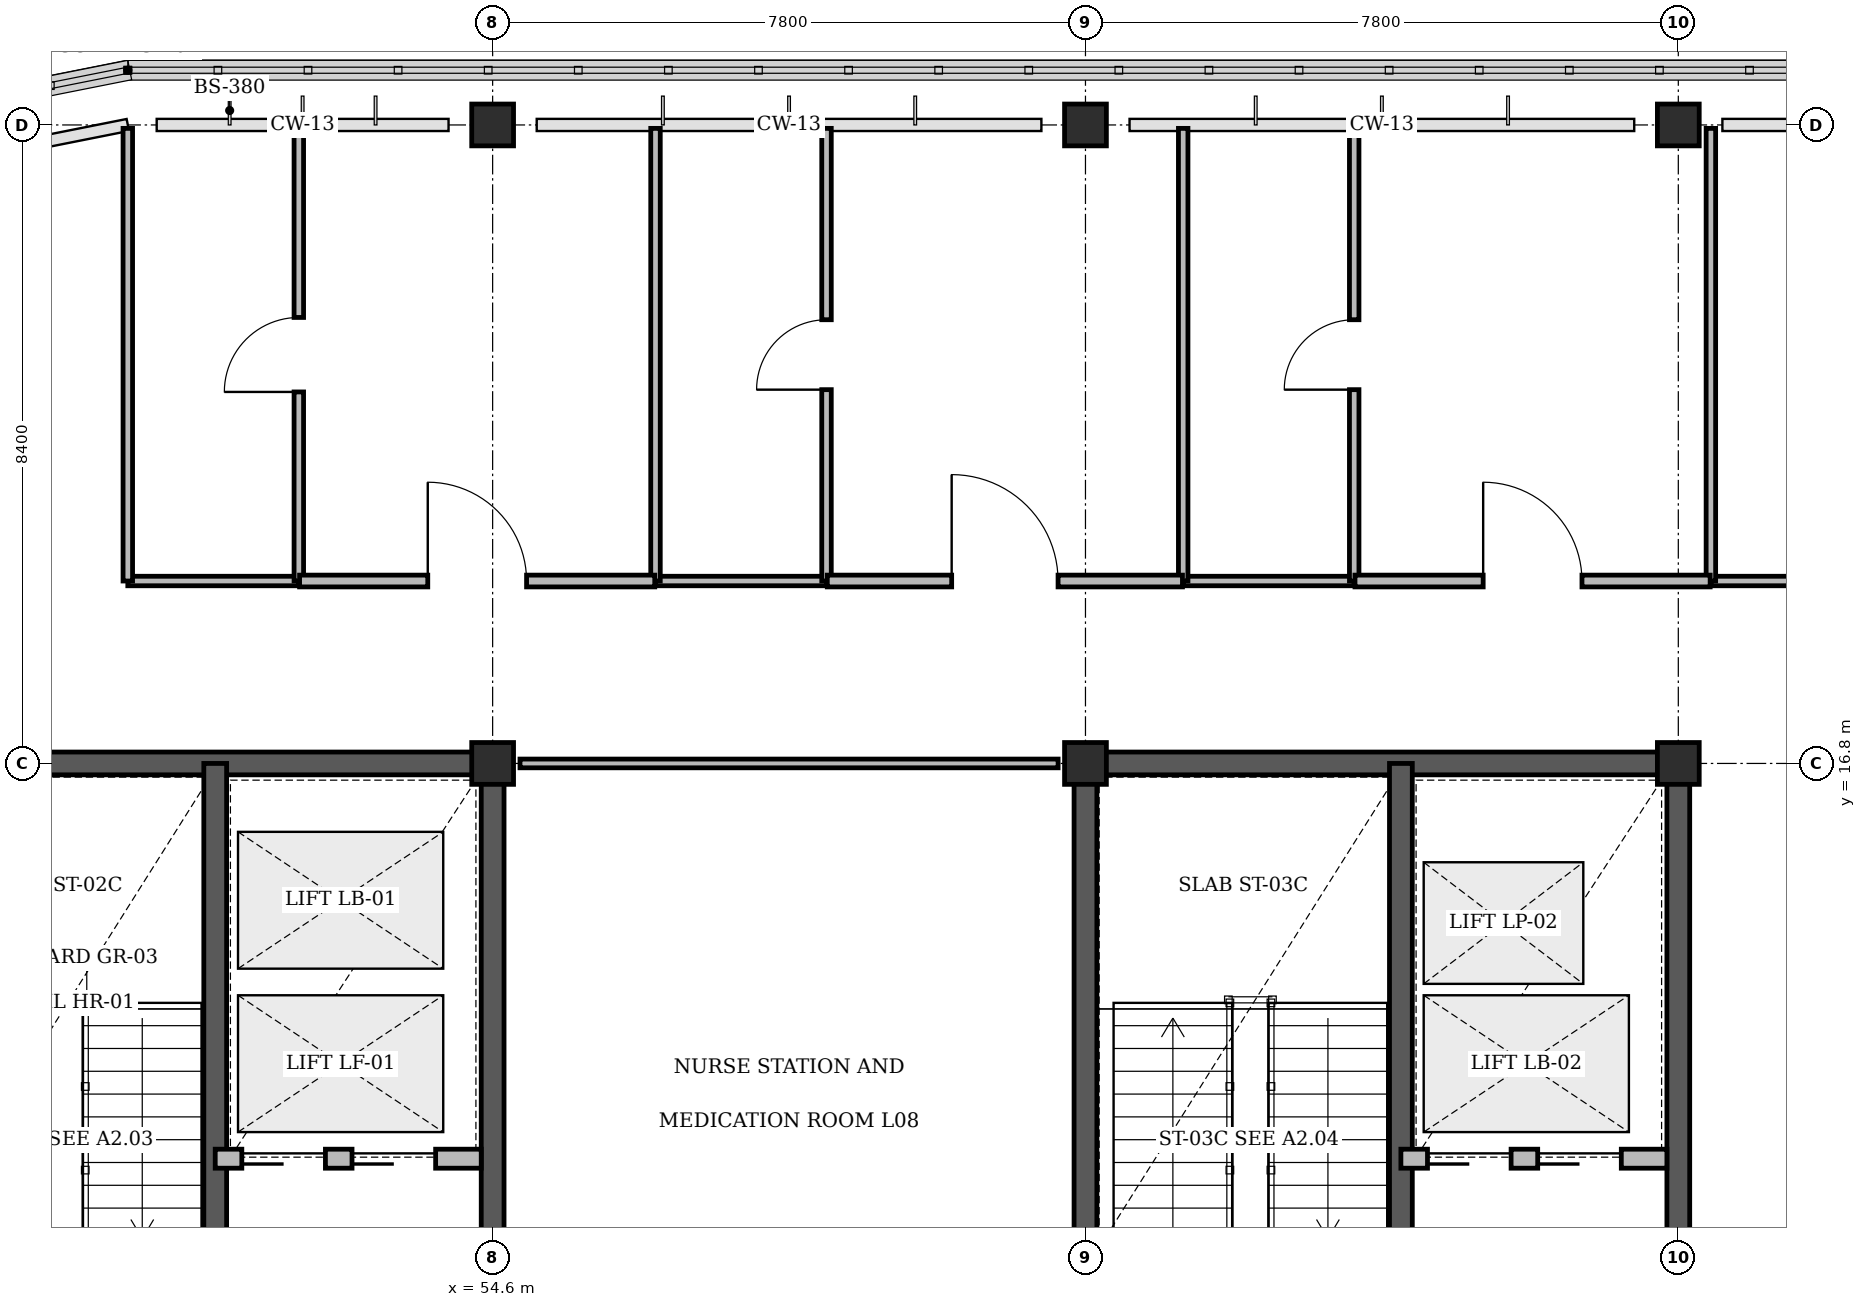
"""IFC4 building model, lengths in metres.
Left out: names, types, materials, properties, quantities, classifications, styles, units other than length and angle.
Written with IfcOpenShell. Run it as: python <this file> out.ifc"""

import sys

from ifc_helpers import new_model, si_unit, direction, frame, frame_2d, origin, origin_2d, place, context, subcontext, project, spatial, rectangle, extrude, element, fill, save


model = new_model("IFC4")
c1 = context("Model", 3, precision=1e-05, world=origin(), true_north=direction((0.0, 1.0)))
c2 = subcontext(c1, "Body", "Model", "MODEL_VIEW")
j1 = project(units=[si_unit("LENGTHUNIT", "METRE"), si_unit("PLANEANGLEUNIT", "RADIAN")], contexts=[c1])
p1 = place(None, origin())
s1 = spatial("IfcSite", under=j1, at=p1, CompositionType="ELEMENT")
p2 = place(p1, origin())
s2 = spatial("IfcBuilding", under=s1, at=p2, CompositionType="ELEMENT")
p3 = place(p2, frame((0.0, 0.0, 34.8)))
s3 = spatial("IfcBuildingStorey", under=s2, at=p3, CompositionType="ELEMENT", Elevation=34.8)
p4 = place(p3, frame((46.65, 16.8, 0.0), z_axis=(0.0, 0.0, 1.0), x_axis=(1.0, 0.0, 0.0)))
e1 = element("IfcWall", 1, at=p4, inside=s3, PredefinedType="SHEAR", context=c2, shape_type="SweptSolid", body=[
    extrude(rectangle(XDim=8.1, YDim=0.3, at=frame_2d((4.05, 0.0))), origin(), (0.0, 0.0, 1.0), 3.92),
])
p5 = place(p3, frame((54.6, 8.4, 0.0), z_axis=(0.0, 0.0, 1.0), x_axis=(0.0, 1.0, 0.0)))
e2 = element("IfcWall", 2, at=p5, inside=s3, PredefinedType="SHEAR", context=c2, shape_type="SweptSolid", body=[
    extrude(rectangle(XDim=8.4, YDim=0.3, at=frame_2d((4.2, 0.0))), origin(), (0.0, 0.0, 1.0), 3.92),
])
p6 = place(p3, frame((62.25, 16.8, 0.0), z_axis=(0.0, 0.0, 1.0), x_axis=(1.0, 0.0, 0.0)))
e3 = element("IfcWall", 3, at=p6, inside=s3, PredefinedType="SHEAR", context=c2, shape_type="SweptSolid", body=[
    extrude(rectangle(XDim=8.1, YDim=0.3, at=frame_2d((4.05, 0.0))), origin(), (0.0, 0.0, 1.0), 3.92),
])
for number, where, z_axis, x_axis in (
    (4, (62.4, 8.4, 0.0), (0.0, 0.0, 1.0), (0.0, 1.0, 0.0)),
    (5, (70.2, 8.4, 0.0), (0.0, 0.0, 1.0), (0.0, 1.0, 0.0)),
):
    element("IfcWall", number, at=place(p3, frame(where, z_axis=z_axis, x_axis=x_axis)), inside=s3, PredefinedType="SHEAR", context=c2, shape_type="SweptSolid", body=[
        extrude(rectangle(XDim=8.4, YDim=0.3, at=frame_2d((4.2, 0.0))), origin(), (0.0, 0.0, 1.0), 3.92),
    ])
for number, where, z_axis, x_axis in (
    (6, (54.6, 16.8, 0.0), (0.0, 0.0, 1.0), (1.0, 0.0, 0.0)),
    (7, (54.6, 25.2, 0.0), (0.0, 0.0, 1.0), (1.0, 0.0, 0.0)),
    (8, (62.4, 16.8, 0.0), (0.0, 0.0, 1.0), (1.0, 0.0, 0.0)),
    (9, (62.4, 25.2, 0.0), (0.0, 0.0, 1.0), (1.0, 0.0, 0.0)),
    (10, (70.2, 16.8, 0.0), (0.0, 0.0, 1.0), (1.0, 0.0, 0.0)),
    (11, (70.2, 25.2, 0.0), (0.0, 0.0, 1.0), (1.0, 0.0, 0.0)),
):
    element("IfcColumn", number, at=place(p3, frame(where, z_axis=z_axis, x_axis=x_axis)), inside=s3, PredefinedType="COLUMN", context=c2, shape_type="SweptSolid", body=[
        extrude(rectangle(XDim=0.55, YDim=0.55, at=origin_2d()), origin(), (0.0, 0.0, 1.0), 4.2),
    ])
p7 = place(p3, frame((50.95, 8.4, 0.0), z_axis=(0.0, 0.0, 1.0), x_axis=(0.0, 1.0, 0.0)))
e12 = element("IfcWall", 12, at=p7, inside=s3, PredefinedType="SHEAR", context=c2, shape_type="SweptSolid", body=[
    extrude(rectangle(XDim=8.4, YDim=0.3, at=frame_2d((4.2, 0.0))), origin(), (0.0, 0.0, 1.0), 4.2),
])
p8 = place(p7, frame((0.4, 0.0, 0.0)))
e13 = element("IfcOpeningElement", 13, at=p8, cuts=e12, PredefinedType="OPENING", context=c2, shape_type="SweptSolid", body=[
    extrude(rectangle(XDim=1.12, YDim=2.15, at=frame_2d((0.56, 1.075))), frame((0.0, 0.16, 0.0), z_axis=(0.0, -1.0, 0.0), x_axis=(1.0, 0.0, 0.0)), (0.0, 0.0, 1.0), 0.32),
])
p9 = place(p3, frame((50.95, 11.6, 0.0), z_axis=(0.0, 0.0, 1.0), x_axis=(1.0, 0.0, 0.0)))
e14 = element("IfcWall", 14, at=p9, inside=s3, PredefinedType="STANDARD", context=c2, shape_type="SweptSolid", body=[
    extrude(rectangle(XDim=3.5, YDim=0.25, at=frame_2d((1.75, 0.0))), origin(), (0.0, 0.0, 1.0), 3.9),
])
p10 = place(p9, frame((0.35, 0.0, 0.0)))
e15 = element("IfcOpeningElement", 15, at=p10, cuts=e14, PredefinedType="OPENING", context=c2, shape_type="SweptSolid", body=[
    extrude(rectangle(XDim=1.1, YDim=2.2, at=frame_2d((0.55, 1.1))), frame((0.0, 0.135, 0.0), z_axis=(0.0, -1.0, 0.0), x_axis=(1.0, 0.0, 0.0)), (0.0, 0.0, 1.0), 0.27),
])
p11 = place(p9, frame((1.8, 0.0, 0.0)))
e16 = element("IfcOpeningElement", 16, at=p11, cuts=e14, PredefinedType="OPENING", context=c2, shape_type="SweptSolid", body=[
    extrude(rectangle(XDim=1.1, YDim=2.2, at=frame_2d((0.55, 1.1))), frame((0.0, 0.135, 0.0), z_axis=(0.0, -1.0, 0.0), x_axis=(1.0, 0.0, 0.0)), (0.0, 0.0, 1.0), 0.27),
])
p12 = place(p3, frame((66.55, 8.4, 0.0), z_axis=(0.0, 0.0, 1.0), x_axis=(0.0, 1.0, 0.0)))
e17 = element("IfcWall", 17, at=p12, inside=s3, PredefinedType="SHEAR", context=c2, shape_type="SweptSolid", body=[
    extrude(rectangle(XDim=8.4, YDim=0.3, at=frame_2d((4.2, 0.0))), origin(), (0.0, 0.0, 1.0), 4.2),
])
p13 = place(p3, frame((66.55, 11.6, 0.0), z_axis=(0.0, 0.0, 1.0), x_axis=(1.0, 0.0, 0.0)))
e18 = element("IfcWall", 18, at=p13, inside=s3, PredefinedType="STANDARD", context=c2, shape_type="SweptSolid", body=[
    extrude(rectangle(XDim=3.5, YDim=0.25, at=frame_2d((1.75, 0.0))), origin(), (0.0, 0.0, 1.0), 3.9),
])
p14 = place(p13, frame((0.35, 0.0, 0.0)))
e19 = element("IfcOpeningElement", 19, at=p14, cuts=e18, PredefinedType="OPENING", context=c2, shape_type="SweptSolid", body=[
    extrude(rectangle(XDim=1.1, YDim=2.2, at=frame_2d((0.55, 1.1))), frame((0.0, 0.135, 0.0), z_axis=(0.0, -1.0, 0.0), x_axis=(1.0, 0.0, 0.0)), (0.0, 0.0, 1.0), 0.27),
])
p15 = place(p13, frame((1.8, 0.0, 0.0)))
e20 = element("IfcOpeningElement", 20, at=p15, cuts=e18, PredefinedType="OPENING", context=c2, shape_type="SweptSolid", body=[
    extrude(rectangle(XDim=1.1, YDim=2.2, at=frame_2d((0.55, 1.1))), frame((0.0, 0.135, 0.0), z_axis=(0.0, -1.0, 0.0), x_axis=(1.0, 0.0, 0.0)), (0.0, 0.0, 1.0), 0.27),
])
p16 = place(p3, frame((49.8, 19.2, 0.0), z_axis=(0.0, 0.0, 1.0), x_axis=(1.0, 0.0, 0.0)))
e21 = element("IfcWall", 21, at=p16, inside=s3, PredefinedType="PARTITIONING", context=c2, shape_type="SweptSolid", body=[
    extrude(rectangle(XDim=2.25, YDim=0.125, at=frame_2d((1.125, 0.0))), origin(), (0.0, 0.0, 1.0), 3.9),
])
p17 = place(p3, frame((49.8, 19.2, 0.0), z_axis=(0.0, 0.0, 1.0), x_axis=(0.0, 1.0, 0.0)))
e22 = element("IfcWall", 22, at=p17, inside=s3, PredefinedType="PARTITIONING", context=c2, shape_type="SweptSolid", body=[
    extrude(rectangle(XDim=5.955, YDim=0.125, at=frame_2d((2.978, 0.0))), origin(), (0.0, 0.0, 1.0), 3.9),
])
p18 = place(p3, frame((52.05, 19.2, 0.0), z_axis=(0.0, 0.0, 1.0), x_axis=(0.0, 1.0, 0.0)))
e23 = element("IfcWall", 23, at=p18, inside=s3, PredefinedType="PARTITIONING", context=c2, shape_type="SweptSolid", body=[
    extrude(rectangle(XDim=5.955, YDim=0.125, at=frame_2d((2.978, 0.0))), origin(), (0.0, 0.0, 1.0), 3.9),
])
p19 = place(p18, frame((2.488, 0.0, 0.0)))
e24 = element("IfcOpeningElement", 24, at=p19, cuts=e23, PredefinedType="OPENING", context=c2, shape_type="SweptSolid", body=[
    extrude(rectangle(XDim=0.98, YDim=2.1, at=frame_2d((0.49, 1.05))), frame((0.0, 0.073, 0.0), z_axis=(0.0, -1.0, 0.0), x_axis=(1.0, 0.0, 0.0)), (0.0, 0.0, 1.0), 0.145),
])
p20 = place(p3, frame((56.743, 19.2, 0.0), z_axis=(0.0, 0.0, 1.0), x_axis=(1.0, 0.0, 0.0)))
e25 = element("IfcWall", 25, at=p20, inside=s3, PredefinedType="PARTITIONING", context=c2, shape_type="SweptSolid", body=[
    extrude(rectangle(XDim=2.25, YDim=0.125, at=frame_2d((1.125, 0.0))), origin(), (0.0, 0.0, 1.0), 3.9),
])
p21 = place(p3, frame((56.743, 19.2, 0.0), z_axis=(0.0, 0.0, 1.0), x_axis=(0.0, 1.0, 0.0)))
e26 = element("IfcWall", 26, at=p21, inside=s3, PredefinedType="PARTITIONING", context=c2, shape_type="SweptSolid", body=[
    extrude(rectangle(XDim=5.955, YDim=0.125, at=frame_2d((2.978, 0.0))), origin(), (0.0, 0.0, 1.0), 3.9),
])
p22 = place(p3, frame((58.993, 19.2, 0.0), z_axis=(0.0, 0.0, 1.0), x_axis=(0.0, 1.0, 0.0)))
e27 = element("IfcWall", 27, at=p22, inside=s3, PredefinedType="PARTITIONING", context=c2, shape_type="SweptSolid", body=[
    extrude(rectangle(XDim=5.955, YDim=0.125, at=frame_2d((2.978, 0.0))), origin(), (0.0, 0.0, 1.0), 3.9),
])
p23 = place(p22, frame((2.518, 0.0, 0.0)))
e28 = element("IfcOpeningElement", 28, at=p23, cuts=e27, PredefinedType="OPENING", context=c2, shape_type="SweptSolid", body=[
    extrude(rectangle(XDim=0.92, YDim=2.1, at=frame_2d((0.46, 1.05))), frame((0.0, 0.073, 0.0), z_axis=(0.0, -1.0, 0.0), x_axis=(1.0, 0.0, 0.0)), (0.0, 0.0, 1.0), 0.145),
])
p24 = place(p3, frame((63.686, 19.2, 0.0), z_axis=(0.0, 0.0, 1.0), x_axis=(1.0, 0.0, 0.0)))
e29 = element("IfcWall", 29, at=p24, inside=s3, PredefinedType="PARTITIONING", context=c2, shape_type="SweptSolid", body=[
    extrude(rectangle(XDim=2.25, YDim=0.125, at=frame_2d((1.125, 0.0))), origin(), (0.0, 0.0, 1.0), 3.9),
])
p25 = place(p3, frame((63.686, 19.2, 0.0), z_axis=(0.0, 0.0, 1.0), x_axis=(0.0, 1.0, 0.0)))
e30 = element("IfcWall", 30, at=p25, inside=s3, PredefinedType="PARTITIONING", context=c2, shape_type="SweptSolid", body=[
    extrude(rectangle(XDim=5.955, YDim=0.125, at=frame_2d((2.978, 0.0))), origin(), (0.0, 0.0, 1.0), 3.9),
])
p26 = place(p3, frame((65.936, 19.2, 0.0), z_axis=(0.0, 0.0, 1.0), x_axis=(0.0, 1.0, 0.0)))
e31 = element("IfcWall", 31, at=p26, inside=s3, PredefinedType="PARTITIONING", context=c2, shape_type="SweptSolid", body=[
    extrude(rectangle(XDim=5.955, YDim=0.125, at=frame_2d((2.978, 0.0))), origin(), (0.0, 0.0, 1.0), 3.9),
])
p27 = place(p26, frame((2.518, 0.0, 0.0)))
e32 = element("IfcOpeningElement", 32, at=p27, cuts=e31, PredefinedType="OPENING", context=c2, shape_type="SweptSolid", body=[
    extrude(rectangle(XDim=0.92, YDim=2.1, at=frame_2d((0.46, 1.05))), frame((0.0, 0.073, 0.0), z_axis=(0.0, -1.0, 0.0), x_axis=(1.0, 0.0, 0.0)), (0.0, 0.0, 1.0), 0.145),
])
p28 = place(p3, frame((70.629, 19.2, 0.0), z_axis=(0.0, 0.0, 1.0), x_axis=(1.0, 0.0, 0.0)))
e33 = element("IfcWall", 33, at=p28, inside=s3, PredefinedType="PARTITIONING", context=c2, shape_type="SweptSolid", body=[
    extrude(rectangle(XDim=2.25, YDim=0.125, at=frame_2d((1.125, 0.0))), origin(), (0.0, 0.0, 1.0), 3.9),
])
p29 = place(p3, frame((70.629, 19.2, 0.0), z_axis=(0.0, 0.0, 1.0), x_axis=(0.0, 1.0, 0.0)))
e34 = element("IfcWall", 34, at=p29, inside=s3, PredefinedType="PARTITIONING", context=c2, shape_type="SweptSolid", body=[
    extrude(rectangle(XDim=5.955, YDim=0.125, at=frame_2d((2.978, 0.0))), origin(), (0.0, 0.0, 1.0), 3.32),
])
p30 = place(p3, frame((52.06, 19.2, 0.0), z_axis=(0.0, 0.0, 1.0), x_axis=(1.0, 0.0, 0.0)))
e35 = element("IfcWall", 35, at=p30, inside=s3, PredefinedType="PARTITIONING", context=c2, shape_type="SweptSolid", body=[
    extrude(rectangle(XDim=4.673, YDim=0.155, at=frame_2d((2.336, 0.0))), origin(), (0.0, 0.0, 1.0), 3.9),
])
p31 = place(p30, frame((1.687, 0.0, 0.0)))
e36 = element("IfcOpeningElement", 36, at=p31, cuts=e35, PredefinedType="OPENING", context=c2, shape_type="SweptSolid", body=[
    extrude(rectangle(XDim=1.3, YDim=2.15, at=frame_2d((0.65, 1.075))), frame((0.0, 0.087, 0.0), z_axis=(0.0, -1.0, 0.0), x_axis=(1.0, 0.0, 0.0)), (0.0, 0.0, 1.0), 0.175),
])
p32 = place(p3, frame((59.003, 19.2, 0.0), z_axis=(0.0, 0.0, 1.0), x_axis=(1.0, 0.0, 0.0)))
e37 = element("IfcWall", 37, at=p32, inside=s3, PredefinedType="PARTITIONING", context=c2, shape_type="SweptSolid", body=[
    extrude(rectangle(XDim=4.673, YDim=0.155, at=frame_2d((2.336, 0.0))), origin(), (0.0, 0.0, 1.0), 3.9),
])
p33 = place(p32, frame((1.636, 0.0, 0.0)))
e38 = element("IfcOpeningElement", 38, at=p33, cuts=e37, PredefinedType="OPENING", context=c2, shape_type="SweptSolid", body=[
    extrude(rectangle(XDim=1.4, YDim=2.2, at=frame_2d((0.7, 1.1))), frame((0.0, 0.087, 0.0), z_axis=(0.0, -1.0, 0.0), x_axis=(1.0, 0.0, 0.0)), (0.0, 0.0, 1.0), 0.175),
])
p34 = place(p3, frame((65.946, 19.2, 0.0), z_axis=(0.0, 0.0, 1.0), x_axis=(1.0, 0.0, 0.0)))
e39 = element("IfcWall", 39, at=p34, inside=s3, PredefinedType="PARTITIONING", context=c2, shape_type="SweptSolid", body=[
    extrude(rectangle(XDim=4.673, YDim=0.155, at=frame_2d((2.336, 0.0))), origin(), (0.0, 0.0, 1.0), 3.9),
])
p35 = place(p34, frame((1.687, 0.0, 0.0)))
e40 = element("IfcOpeningElement", 40, at=p35, cuts=e39, PredefinedType="OPENING", context=c2, shape_type="SweptSolid", body=[
    extrude(rectangle(XDim=1.3, YDim=2.15, at=frame_2d((0.65, 1.075))), frame((0.0, 0.087, 0.0), z_axis=(0.0, -1.0, 0.0), x_axis=(1.0, 0.0, 0.0)), (0.0, 0.0, 1.0), 0.175),
])
p36 = place(p3, frame((54.96, 16.8, 0.0), z_axis=(0.0, 0.0, 1.0), x_axis=(1.0, 0.0, 0.0)))
e41 = element("IfcWall", 41, at=p36, inside=s3, PredefinedType="PARTITIONING", context=c2, shape_type="SweptSolid", body=[
    extrude(rectangle(XDim=7.08, YDim=0.115, at=frame_2d((3.54, 0.0))), origin(), (0.0, 0.0, 1.0), 3.32),
])
p37 = place(p10, origin())
e42 = element("IfcDoor", 42, at=p37, inside=s3, OperationType="SLIDING_TO_LEFT", PredefinedType="DOOR", context=c2, shape_type="SweptSolid", body=[
    extrude(rectangle(XDim=1.1, YDim=2.2, at=frame_2d((0.55, 1.1))), frame((0.0, 0.025, 0.0), z_axis=(0.0, -1.0, 0.0), x_axis=(1.0, 0.0, 0.0)), (0.0, 0.0, 1.0), 0.05),
])
fill(e15, e42)
p38 = place(p11, origin())
e43 = element("IfcDoor", 43, at=p38, inside=s3, OperationType="SLIDING_TO_LEFT", PredefinedType="DOOR", context=c2, shape_type="SweptSolid", body=[
    extrude(rectangle(XDim=1.1, YDim=2.2, at=frame_2d((0.55, 1.1))), frame((0.0, 0.025, 0.0), z_axis=(0.0, -1.0, 0.0), x_axis=(1.0, 0.0, 0.0)), (0.0, 0.0, 1.0), 0.05),
])
fill(e16, e43)
p39 = place(p14, origin())
e44 = element("IfcDoor", 44, at=p39, inside=s3, OperationType="SLIDING_TO_LEFT", PredefinedType="DOOR", context=c2, shape_type="SweptSolid", body=[
    extrude(rectangle(XDim=1.1, YDim=2.2, at=frame_2d((0.55, 1.1))), frame((0.0, 0.025, 0.0), z_axis=(0.0, -1.0, 0.0), x_axis=(1.0, 0.0, 0.0)), (0.0, 0.0, 1.0), 0.05),
])
fill(e19, e44)
p40 = place(p15, origin())
e45 = element("IfcDoor", 45, at=p40, inside=s3, OperationType="SLIDING_TO_LEFT", PredefinedType="DOOR", context=c2, shape_type="SweptSolid", body=[
    extrude(rectangle(XDim=1.1, YDim=2.2, at=frame_2d((0.55, 1.1))), frame((0.0, 0.025, 0.0), z_axis=(0.0, -1.0, 0.0), x_axis=(1.0, 0.0, 0.0)), (0.0, 0.0, 1.0), 0.05),
])
fill(e20, e45)
p41 = place(p19, origin())
e46 = element("IfcDoor", 46, at=p41, inside=s3, OperationType="SINGLE_SWING_LEFT", PredefinedType="DOOR", context=c2, shape_type="SweptSolid", body=[
    extrude(rectangle(XDim=0.98, YDim=2.1, at=frame_2d((0.49, 1.05))), frame((0.0, 0.025, 0.0), z_axis=(0.0, -1.0, 0.0), x_axis=(1.0, 0.0, 0.0)), (0.0, 0.0, 1.0), 0.05),
])
fill(e24, e46)
p42 = place(p23, origin())
e47 = element("IfcDoor", 47, at=p42, inside=s3, OperationType="SINGLE_SWING_LEFT", PredefinedType="DOOR", context=c2, shape_type="SweptSolid", body=[
    extrude(rectangle(XDim=0.92, YDim=2.1, at=frame_2d((0.46, 1.05))), frame((0.0, 0.025, 0.0), z_axis=(0.0, -1.0, 0.0), x_axis=(1.0, 0.0, 0.0)), (0.0, 0.0, 1.0), 0.05),
])
fill(e28, e47)
p43 = place(p27, origin())
e48 = element("IfcDoor", 48, at=p43, inside=s3, OperationType="SINGLE_SWING_LEFT", PredefinedType="DOOR", context=c2, shape_type="SweptSolid", body=[
    extrude(rectangle(XDim=0.92, YDim=2.1, at=frame_2d((0.46, 1.05))), frame((0.0, 0.025, 0.0), z_axis=(0.0, -1.0, 0.0), x_axis=(1.0, 0.0, 0.0)), (0.0, 0.0, 1.0), 0.05),
])
fill(e32, e48)
p44 = place(p31, origin())
e49 = element("IfcDoor", 49, at=p44, inside=s3, OperationType="SINGLE_SWING_LEFT", PredefinedType="DOOR", context=c2, shape_type="SweptSolid", body=[
    extrude(rectangle(XDim=1.3, YDim=2.15, at=frame_2d((0.65, 1.075))), frame((0.0, 0.025, 0.0), z_axis=(0.0, -1.0, 0.0), x_axis=(1.0, 0.0, 0.0)), (0.0, 0.0, 1.0), 0.05),
])
fill(e36, e49)
p45 = place(p33, origin())
e50 = element("IfcDoor", 50, at=p45, inside=s3, OperationType="SINGLE_SWING_LEFT", PredefinedType="DOOR", context=c2, shape_type="SweptSolid", body=[
    extrude(rectangle(XDim=1.4, YDim=2.2, at=frame_2d((0.7, 1.1))), frame((0.0, 0.025, 0.0), z_axis=(0.0, -1.0, 0.0), x_axis=(1.0, 0.0, 0.0)), (0.0, 0.0, 1.0), 0.05),
])
fill(e38, e50)
p46 = place(p35, origin())
e51 = element("IfcDoor", 51, at=p46, inside=s3, OperationType="SINGLE_SWING_LEFT", PredefinedType="DOOR", context=c2, shape_type="SweptSolid", body=[
    extrude(rectangle(XDim=1.3, YDim=2.15, at=frame_2d((0.65, 1.075))), frame((0.0, 0.025, 0.0), z_axis=(0.0, -1.0, 0.0), x_axis=(1.0, 0.0, 0.0)), (0.0, 0.0, 1.0), 0.05),
])
fill(e40, e51)
save(model, sys.argv[1])
